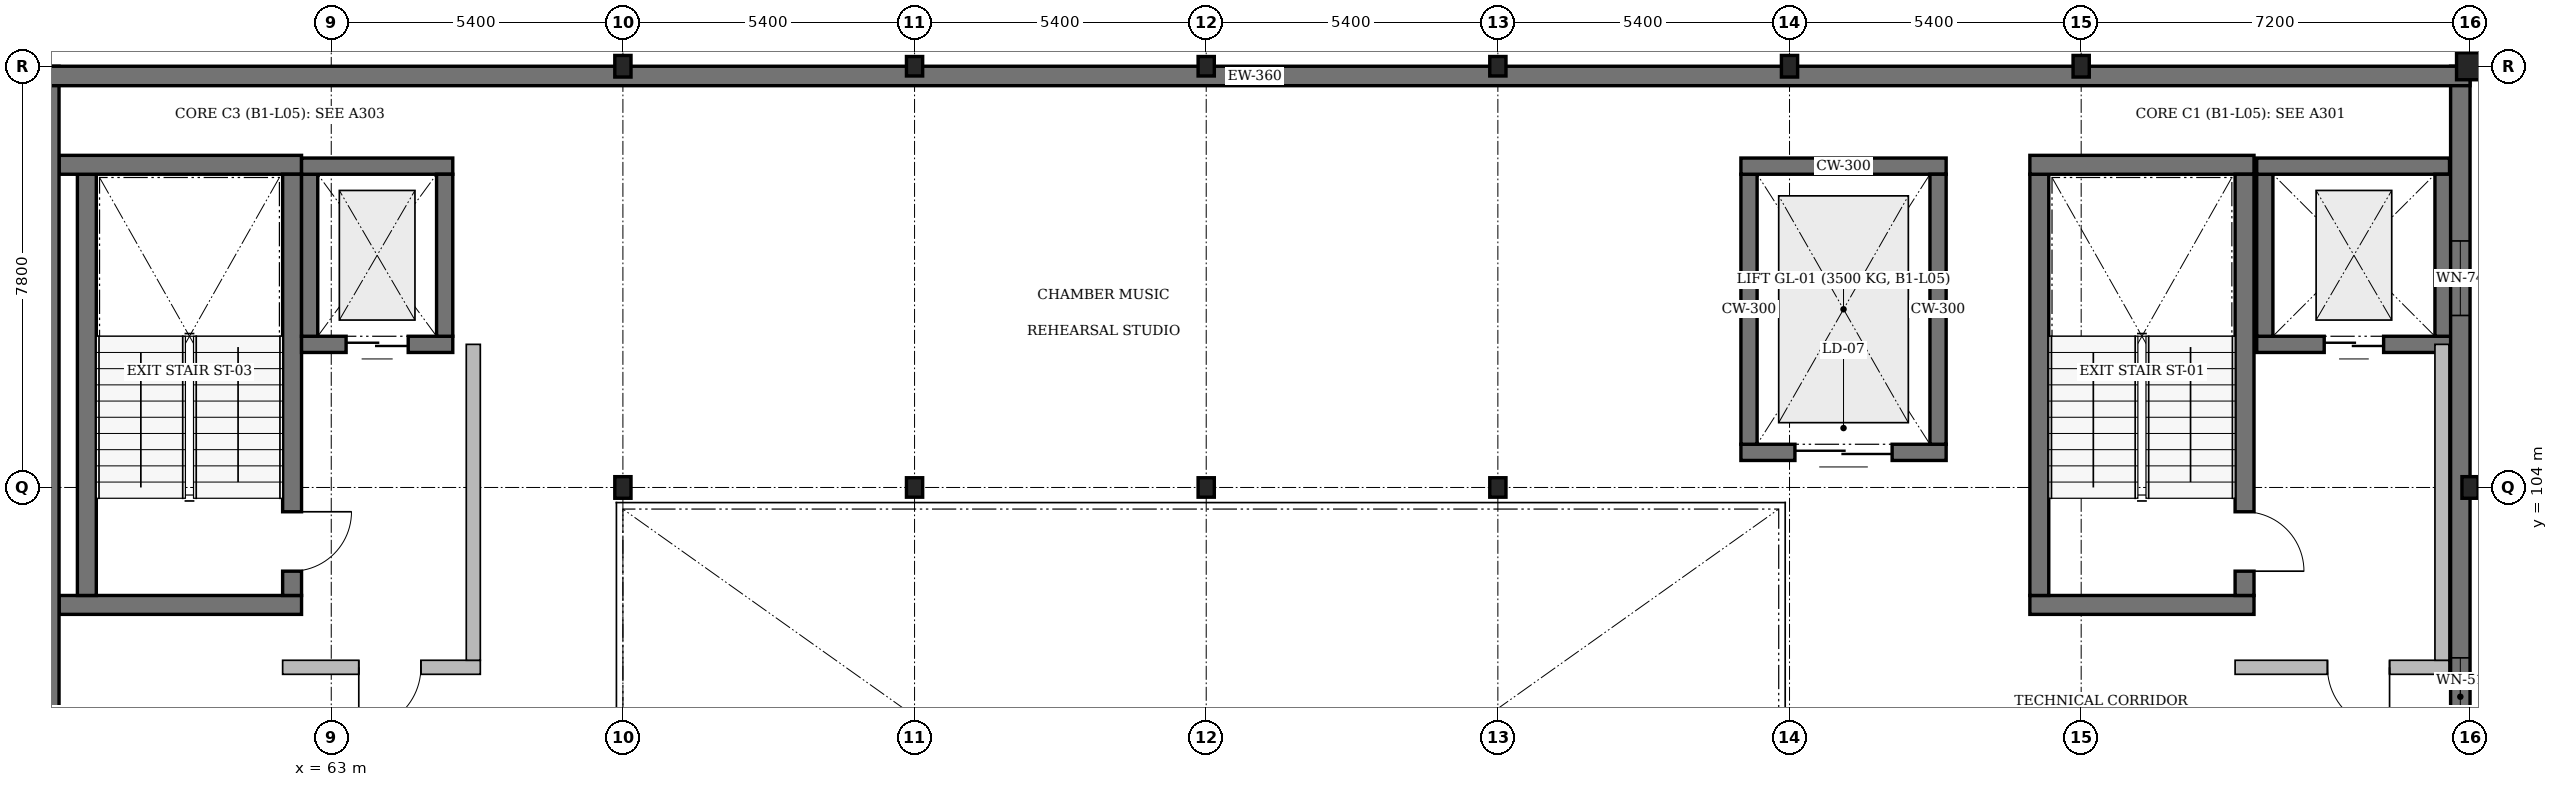
"""IFC4 building model, lengths in metres.
Left out: names, types, materials, properties, quantities, classifications, styles, units other than length and angle.
Written with IfcOpenShell. Run it as: python <this file> out.ifc"""

import sys

from ifc_helpers import new_model, si_unit, direction, frame, frame_2d, origin, origin_2d, place, context, subcontext, project, spatial, rectangle, i_section, extrude, element, fill, save


model = new_model("IFC4")
c1 = context("Model", 3, precision=1e-05, world=origin(), true_north=direction((0.0, 1.0)))
c2 = subcontext(c1, "Body", "Model", "MODEL_VIEW")
j1 = project(units=[si_unit("LENGTHUNIT", "METRE"), si_unit("PLANEANGLEUNIT", "RADIAN")], contexts=[c1])
p1 = place(None, origin())
s1 = spatial("IfcSite", under=j1, at=p1, CompositionType="ELEMENT")
p2 = place(p1, origin())
s2 = spatial("IfcBuilding", under=s1, at=p2, CompositionType="ELEMENT")
p3 = place(p2, frame((0.0, 0.0, 17.1)))
s3 = spatial("IfcBuildingStorey", under=s2, at=p3, CompositionType="ELEMENT", Elevation=17.1)
for number, where, z_axis, x_axis in (
    (1, (68.4, 104.0, 0.0), (0.0, 0.0, 1.0), (1.0, 0.0, 0.0)),
    (2, (68.4, 111.8, 0.0), (0.0, 0.0, 1.0), (1.0, 0.0, 0.0)),
):
    element("IfcColumn", number, at=place(p3, frame(where, z_axis=z_axis, x_axis=x_axis)), inside=s3, PredefinedType="COLUMN", context=c2, shape_type="SweptSolid", body=[
        extrude(i_section(OverallWidth=0.3, OverallDepth=0.4, WebThickness=0.013, FlangeThickness=0.024, FilletRadius=0.027, at=origin_2d()), origin(), (0.0, 0.0, 1.0), 3.9),
    ])
for number, where, z_axis, x_axis in (
    (3, (73.8, 104.0, 0.0), (0.0, 0.0, 1.0), (1.0, 0.0, 0.0)),
    (4, (73.8, 111.8, 0.0), (0.0, 0.0, 1.0), (1.0, 0.0, 0.0)),
    (5, (79.2, 104.0, 0.0), (0.0, 0.0, 1.0), (1.0, 0.0, 0.0)),
    (6, (79.2, 111.8, 0.0), (0.0, 0.0, 1.0), (1.0, 0.0, 0.0)),
    (7, (84.6, 104.0, 0.0), (0.0, 0.0, 1.0), (1.0, 0.0, 0.0)),
    (8, (84.6, 111.8, 0.0), (0.0, 0.0, 1.0), (1.0, 0.0, 0.0)),
):
    element("IfcColumn", number, at=place(p3, frame(where, z_axis=z_axis, x_axis=x_axis)), inside=s3, PredefinedType="COLUMN", context=c2, shape_type="SweptSolid", body=[
        extrude(i_section(OverallWidth=0.3, OverallDepth=0.36, WebThickness=0.012, FlangeThickness=0.022, FilletRadius=0.027, at=origin_2d()), origin(), (0.0, 0.0, 1.0), 3.9),
    ])
for number, where, z_axis, x_axis in (
    (9, (90.0, 111.8, 0.0), (0.0, 0.0, 1.0), (1.0, 0.0, 0.0)),
    (10, (95.4, 111.8, 0.0), (0.0, 0.0, 1.0), (1.0, 0.0, 0.0)),
    (11, (102.6, 104.0, 0.0), (0.0, 0.0, 1.0), (1.0, 0.0, 0.0)),
):
    element("IfcColumn", number, at=place(p3, frame(where, z_axis=z_axis, x_axis=x_axis)), inside=s3, PredefinedType="COLUMN", context=c2, shape_type="SweptSolid", body=[
        extrude(i_section(OverallWidth=0.3, OverallDepth=0.4, WebThickness=0.013, FlangeThickness=0.024, FilletRadius=0.027, at=origin_2d()), origin(), (0.0, 0.0, 1.0), 3.9),
    ])
p4 = place(p3, frame((102.6, 111.8, 0.0), z_axis=(0.0, 0.0, 1.0), x_axis=(1.0, 0.0, 0.0)))
e12 = element("IfcColumn", 12, at=p4, inside=s3, PredefinedType="COLUMN", context=c2, shape_type="SweptSolid", body=[
    extrude(rectangle(XDim=0.5, YDim=0.5, at=origin_2d()), origin(), (0.0, 0.0, 1.0), 3.9),
])
p5 = place(p3, frame((98.6, 101.825, 0.0), z_axis=(0.0, 0.0, 1.0), x_axis=(-1.0, 0.0, 0.0)))
e13 = element("IfcWall", 13, at=p5, inside=s3, PredefinedType="SOLIDWALL", context=c2, shape_type="SweptSolid", body=[
    extrude(rectangle(XDim=4.15, YDim=0.35, at=frame_2d((2.075, 0.0))), origin(), (0.0, 0.0, 1.0), 3.9),
])
p6 = place(p3, frame((94.625, 102.0, 0.0), z_axis=(0.0, 0.0, 1.0), x_axis=(0.0, 1.0, 0.0)))
e14 = element("IfcWall", 14, at=p6, inside=s3, PredefinedType="SOLIDWALL", context=c2, shape_type="SweptSolid", body=[
    extrude(rectangle(XDim=7.8, YDim=0.35, at=frame_2d((3.9, 0.0))), origin(), (0.0, 0.0, 1.0), 3.9),
])
p7 = place(p3, frame((94.45, 109.975, 0.0), z_axis=(0.0, 0.0, 1.0), x_axis=(1.0, 0.0, 0.0)))
e15 = element("IfcWall", 15, at=p7, inside=s3, PredefinedType="SOLIDWALL", context=c2, shape_type="SweptSolid", body=[
    extrude(rectangle(XDim=4.15, YDim=0.35, at=frame_2d((2.075, 0.0))), origin(), (0.0, 0.0, 1.0), 3.9),
])
p8 = place(p3, frame((98.425, 109.8, 0.0), z_axis=(0.0, 0.0, 1.0), x_axis=(0.0, -1.0, 0.0)))
e16 = element("IfcWall", 16, at=p8, inside=s3, PredefinedType="SOLIDWALL", context=c2, shape_type="SweptSolid", body=[
    extrude(rectangle(XDim=7.8, YDim=0.35, at=frame_2d((3.9, 0.0))), origin(), (0.0, 0.0, 1.0), 3.9),
])
p9 = place(p8, frame((6.25, 0.0, 0.0)))
e17 = element("IfcOpeningElement", 17, at=p9, cuts=e16, PredefinedType="OPENING", context=c2, shape_type="SweptSolid", body=[
    extrude(rectangle(XDim=1.1, YDim=2.15, at=frame_2d((0.55, 1.075))), frame((0.0, 0.195, 0.0), z_axis=(0.0, -1.0, 0.0), x_axis=(1.0, 0.0, 0.0)), (0.0, 0.0, 1.0), 0.39),
])
p10 = place(p3, frame((102.25, 106.65, 0.0), z_axis=(0.0, 0.0, 1.0), x_axis=(-1.0, 0.0, 0.0)))
e18 = element("IfcWall", 18, at=p10, inside=s3, PredefinedType="SOLIDWALL", context=c2, shape_type="SweptSolid", body=[
    extrude(rectangle(XDim=3.6, YDim=0.3, at=frame_2d((1.8, 0.0))), origin(), (0.0, 0.0, 1.0), 3.9),
])
p11 = place(p10, frame((1.25, 0.0, 0.0)))
e19 = element("IfcOpeningElement", 19, at=p11, cuts=e18, PredefinedType="OPENING", context=c2, shape_type="SweptSolid", body=[
    extrude(rectangle(XDim=1.1, YDim=2.1, at=frame_2d((0.55, 1.05))), frame((0.0, 0.17, 0.0), z_axis=(0.0, -1.0, 0.0), x_axis=(1.0, 0.0, 0.0)), (0.0, 0.0, 1.0), 0.34),
])
p12 = place(p3, frame((98.8, 106.8, 0.0), z_axis=(0.0, 0.0, 1.0), x_axis=(0.0, 1.0, 0.0)))
e20 = element("IfcWall", 20, at=p12, inside=s3, PredefinedType="SOLIDWALL", context=c2, shape_type="SweptSolid", body=[
    extrude(rectangle(XDim=3.0, YDim=0.3, at=frame_2d((1.5, 0.0))), origin(), (0.0, 0.0, 1.0), 3.9),
])
p13 = place(p3, frame((98.65, 109.95, 0.0), z_axis=(0.0, 0.0, 1.0), x_axis=(1.0, 0.0, 0.0)))
e21 = element("IfcWall", 21, at=p13, inside=s3, PredefinedType="SOLIDWALL", context=c2, shape_type="SweptSolid", body=[
    extrude(rectangle(XDim=3.57, YDim=0.3, at=frame_2d((1.785, 0.0))), origin(), (0.0, 0.0, 1.0), 3.9),
])
p14 = place(p3, frame((102.1, 109.8, 0.0), z_axis=(0.0, 0.0, 1.0), x_axis=(0.0, -1.0, 0.0)))
e22 = element("IfcWall", 22, at=p14, inside=s3, PredefinedType="SOLIDWALL", context=c2, shape_type="SweptSolid", body=[
    extrude(rectangle(XDim=3.0, YDim=0.3, at=frame_2d((1.5, 0.0))), origin(), (0.0, 0.0, 1.0), 3.9),
])
p15 = place(p3, frame((102.21, 100.67, 0.0), z_axis=(0.0, 0.0, 1.0), x_axis=(-1.0, 0.0, 0.0)))
e23 = element("IfcWall", 23, at=p15, inside=s3, PredefinedType="SOLIDWALL", context=c2, shape_type="SweptSolid", body=[
    extrude(rectangle(XDim=3.96, YDim=0.26, at=frame_2d((1.98, 0.0))), origin(), (0.0, 0.0, 1.0), 3.68),
])
p16 = place(p15, frame((1.1, 0.0, 0.0)))
e24 = element("IfcOpeningElement", 24, at=p16, cuts=e23, PredefinedType="OPENING", context=c2, shape_type="SweptSolid", body=[
    extrude(rectangle(XDim=1.15, YDim=2.2, at=frame_2d((0.575, 1.1))), frame((0.0, 0.15, 0.0), z_axis=(0.0, -1.0, 0.0), x_axis=(1.0, 0.0, 0.0)), (0.0, 0.0, 1.0), 0.3),
])
p17 = place(p3, frame((102.08, 106.65, 0.0), z_axis=(0.0, 0.0, 1.0), x_axis=(0.0, -1.0, 0.0)))
e25 = element("IfcWall", 25, at=p17, inside=s3, PredefinedType="SOLIDWALL", context=c2, shape_type="SweptSolid", body=[
    extrude(rectangle(XDim=5.85, YDim=0.26, at=frame_2d((2.925, 0.0))), origin(), (0.0, 0.0, 1.0), 3.68),
])
p18 = place(p3, frame((62.45, 101.825, 0.0), z_axis=(0.0, 0.0, 1.0), x_axis=(-1.0, 0.0, 0.0)))
e26 = element("IfcWall", 26, at=p18, inside=s3, PredefinedType="SOLIDWALL", context=c2, shape_type="SweptSolid", body=[
    extrude(rectangle(XDim=4.49, YDim=0.35, at=frame_2d((2.245, 0.0))), origin(), (0.0, 0.0, 1.0), 3.9),
])
p19 = place(p3, frame((58.475, 102.0, 0.0), z_axis=(0.0, 0.0, 1.0), x_axis=(0.0, 1.0, 0.0)))
e27 = element("IfcWall", 27, at=p19, inside=s3, PredefinedType="SOLIDWALL", context=c2, shape_type="SweptSolid", body=[
    extrude(rectangle(XDim=7.8, YDim=0.35, at=frame_2d((3.9, 0.0))), origin(), (0.0, 0.0, 1.0), 3.9),
])
p20 = place(p3, frame((57.96, 109.975, 0.0), z_axis=(0.0, 0.0, 1.0), x_axis=(1.0, 0.0, 0.0)))
e28 = element("IfcWall", 28, at=p20, inside=s3, PredefinedType="SOLIDWALL", context=c2, shape_type="SweptSolid", body=[
    extrude(rectangle(XDim=4.49, YDim=0.35, at=frame_2d((2.245, 0.0))), origin(), (0.0, 0.0, 1.0), 3.9),
])
p21 = place(p3, frame((62.275, 109.8, 0.0), z_axis=(0.0, 0.0, 1.0), x_axis=(0.0, -1.0, 0.0)))
e29 = element("IfcWall", 29, at=p21, inside=s3, PredefinedType="SOLIDWALL", context=c2, shape_type="SweptSolid", body=[
    extrude(rectangle(XDim=7.8, YDim=0.35, at=frame_2d((3.9, 0.0))), origin(), (0.0, 0.0, 1.0), 3.9),
])
p22 = place(p21, frame((6.25, 0.0, 0.0)))
e30 = element("IfcOpeningElement", 30, at=p22, cuts=e29, PredefinedType="OPENING", context=c2, shape_type="SweptSolid", body=[
    extrude(rectangle(XDim=1.1, YDim=2.15, at=frame_2d((0.55, 1.075))), frame((0.0, 0.195, 0.0), z_axis=(0.0, -1.0, 0.0), x_axis=(1.0, 0.0, 0.0)), (0.0, 0.0, 1.0), 0.39),
])
p23 = place(p3, frame((65.25, 106.65, 0.0), z_axis=(0.0, 0.0, 1.0), x_axis=(-1.0, 0.0, 0.0)))
e31 = element("IfcWall", 31, at=p23, inside=s3, PredefinedType="SOLIDWALL", context=c2, shape_type="SweptSolid", body=[
    extrude(rectangle(XDim=2.8, YDim=0.3, at=frame_2d((1.4, 0.0))), origin(), (0.0, 0.0, 1.0), 3.9),
])
p24 = place(p23, frame((0.825, 0.0, 0.0)))
e32 = element("IfcOpeningElement", 32, at=p24, cuts=e31, PredefinedType="OPENING", context=c2, shape_type="SweptSolid", body=[
    extrude(rectangle(XDim=1.15, YDim=2.1, at=frame_2d((0.575, 1.05))), frame((0.0, 0.17, 0.0), z_axis=(0.0, -1.0, 0.0), x_axis=(1.0, 0.0, 0.0)), (0.0, 0.0, 1.0), 0.34),
])
p25 = place(p3, frame((62.6, 106.8, 0.0), z_axis=(0.0, 0.0, 1.0), x_axis=(0.0, 1.0, 0.0)))
e33 = element("IfcWall", 33, at=p25, inside=s3, PredefinedType="SOLIDWALL", context=c2, shape_type="SweptSolid", body=[
    extrude(rectangle(XDim=3.0, YDim=0.3, at=frame_2d((1.5, 0.0))), origin(), (0.0, 0.0, 1.0), 3.9),
])
p26 = place(p3, frame((62.45, 109.95, 0.0), z_axis=(0.0, 0.0, 1.0), x_axis=(1.0, 0.0, 0.0)))
e34 = element("IfcWall", 34, at=p26, inside=s3, PredefinedType="SOLIDWALL", context=c2, shape_type="SweptSolid", body=[
    extrude(rectangle(XDim=2.8, YDim=0.3, at=frame_2d((1.4, 0.0))), origin(), (0.0, 0.0, 1.0), 3.9),
])
p27 = place(p3, frame((65.1, 109.8, 0.0), z_axis=(0.0, 0.0, 1.0), x_axis=(0.0, -1.0, 0.0)))
e35 = element("IfcWall", 35, at=p27, inside=s3, PredefinedType="SOLIDWALL", context=c2, shape_type="SweptSolid", body=[
    extrude(rectangle(XDim=3.0, YDim=0.3, at=frame_2d((1.5, 0.0))), origin(), (0.0, 0.0, 1.0), 3.9),
])
p28 = place(p3, frame((65.76, 100.67, 0.0), z_axis=(0.0, 0.0, 1.0), x_axis=(-1.0, 0.0, 0.0)))
e36 = element("IfcWall", 36, at=p28, inside=s3, PredefinedType="SOLIDWALL", context=c2, shape_type="SweptSolid", body=[
    extrude(rectangle(XDim=3.66, YDim=0.26, at=frame_2d((1.83, 0.0))), origin(), (0.0, 0.0, 1.0), 3.68),
])
p29 = place(p28, frame((1.1, 0.0, 0.0)))
e37 = element("IfcOpeningElement", 37, at=p29, cuts=e36, PredefinedType="OPENING", context=c2, shape_type="SweptSolid", body=[
    extrude(rectangle(XDim=1.15, YDim=2.2, at=frame_2d((0.575, 1.1))), frame((0.0, 0.15, 0.0), z_axis=(0.0, -1.0, 0.0), x_axis=(1.0, 0.0, 0.0)), (0.0, 0.0, 1.0), 0.3),
])
p30 = place(p3, frame((65.63, 106.65, 0.0), z_axis=(0.0, 0.0, 1.0), x_axis=(0.0, -1.0, 0.0)))
e38 = element("IfcWall", 38, at=p30, inside=s3, PredefinedType="SOLIDWALL", context=c2, shape_type="SweptSolid", body=[
    extrude(rectangle(XDim=5.85, YDim=0.26, at=frame_2d((2.925, 0.0))), origin(), (0.0, 0.0, 1.0), 3.68),
])
p31 = place(p3, frame((92.9, 104.65, 0.0), z_axis=(0.0, 0.0, 1.0), x_axis=(-1.0, 0.0, 0.0)))
e39 = element("IfcWall", 39, at=p31, inside=s3, PredefinedType="SOLIDWALL", context=c2, shape_type="SweptSolid", body=[
    extrude(rectangle(XDim=3.8, YDim=0.3, at=frame_2d((1.9, 0.0))), origin(), (0.0, 0.0, 1.0), 3.9),
])
p32 = place(p31, frame((1.0, 0.0, 0.0)))
e40 = element("IfcOpeningElement", 40, at=p32, cuts=e39, PredefinedType="OPENING", context=c2, shape_type="SweptSolid", body=[
    extrude(rectangle(XDim=1.8, YDim=2.4, at=frame_2d((0.9, 1.2))), frame((0.0, 0.17, 0.0), z_axis=(0.0, -1.0, 0.0), x_axis=(1.0, 0.0, 0.0)), (0.0, 0.0, 1.0), 0.34),
])
p33 = place(p3, frame((89.25, 104.8, 0.0), z_axis=(0.0, 0.0, 1.0), x_axis=(0.0, 1.0, 0.0)))
e41 = element("IfcWall", 41, at=p33, inside=s3, PredefinedType="SOLIDWALL", context=c2, shape_type="SweptSolid", body=[
    extrude(rectangle(XDim=5.0, YDim=0.3, at=frame_2d((2.5, 0.0))), origin(), (0.0, 0.0, 1.0), 3.9),
])
p34 = place(p3, frame((89.1, 109.95, 0.0), z_axis=(0.0, 0.0, 1.0), x_axis=(1.0, 0.0, 0.0)))
e42 = element("IfcWall", 42, at=p34, inside=s3, PredefinedType="SOLIDWALL", context=c2, shape_type="SweptSolid", body=[
    extrude(rectangle(XDim=3.8, YDim=0.3, at=frame_2d((1.9, 0.0))), origin(), (0.0, 0.0, 1.0), 3.9),
])
p35 = place(p3, frame((92.75, 109.8, 0.0), z_axis=(0.0, 0.0, 1.0), x_axis=(0.0, -1.0, 0.0)))
e43 = element("IfcWall", 43, at=p35, inside=s3, PredefinedType="SOLIDWALL", context=c2, shape_type="SweptSolid", body=[
    extrude(rectangle(XDim=5.0, YDim=0.3, at=frame_2d((2.5, 0.0))), origin(), (0.0, 0.0, 1.0), 3.9),
])
p36 = place(p3, frame((57.78, 87.8, 0.0), z_axis=(0.0, 0.0, 1.0), x_axis=(0.0, 1.0, 0.0)))
e44 = element("IfcWall", 44, at=p36, inside=s3, PredefinedType="SOLIDWALL", context=c2, shape_type="SweptSolid", body=[
    extrude(rectangle(XDim=24.0, YDim=0.36, at=frame_2d((12.0, 0.0))), origin(), (0.0, 0.0, 1.0), 3.65),
])
p37 = place(p3, frame((102.42, 87.8, 0.0), z_axis=(0.0, 0.0, 1.0), x_axis=(0.0, 1.0, 0.0)))
e45 = element("IfcWall", 45, at=p37, inside=s3, PredefinedType="SOLIDWALL", context=c2, shape_type="SweptSolid", body=[
    extrude(rectangle(XDim=24.0, YDim=0.36, at=frame_2d((12.0, 0.0))), origin(), (0.0, 0.0, 1.0), 3.65),
])
p38 = place(p37, frame((3.625, 0.0, 0.95)))
e46 = element("IfcOpeningElement", 46, at=p38, cuts=e45, PredefinedType="OPENING", context=c2, shape_type="SweptSolid", body=[
    extrude(rectangle(XDim=1.15, YDim=1.95, at=frame_2d((0.575, 0.975))), frame((0.0, 0.2, 0.0), z_axis=(0.0, -1.0, 0.0), x_axis=(1.0, 0.0, 0.0)), (0.0, 0.0, 1.0), 0.4),
])
p39 = place(p37, frame((11.605, 0.0, 0.95)))
e47 = element("IfcOpeningElement", 47, at=p39, cuts=e45, PredefinedType="OPENING", context=c2, shape_type="SweptSolid", body=[
    extrude(rectangle(XDim=1.44, YDim=1.7, at=frame_2d((0.72, 0.85))), frame((0.0, 0.2, 0.0), z_axis=(0.0, -1.0, 0.0), x_axis=(1.0, 0.0, 0.0)), (0.0, 0.0, 1.0), 0.4),
])
p40 = place(p37, frame((19.385, 0.0, 0.95)))
e48 = element("IfcOpeningElement", 48, at=p40, cuts=e45, PredefinedType="OPENING", context=c2, shape_type="SweptSolid", body=[
    extrude(rectangle(XDim=1.38, YDim=1.95, at=frame_2d((0.69, 0.975))), frame((0.0, 0.2, 0.0), z_axis=(0.0, -1.0, 0.0), x_axis=(1.0, 0.0, 0.0)), (0.0, 0.0, 1.0), 0.4),
])
p41 = place(p3, frame((57.6, 111.62, 0.0), z_axis=(0.0, 0.0, 1.0), x_axis=(1.0, 0.0, 0.0)))
e49 = element("IfcWall", 49, at=p41, inside=s3, PredefinedType="SOLIDWALL", context=c2, shape_type="SweptSolid", body=[
    extrude(rectangle(XDim=45.0, YDim=0.36, at=frame_2d((22.5, 0.0))), origin(), (0.0, 0.0, 1.0), 3.65),
])
p42 = place(p9, origin())
e50 = element("IfcDoor", 50, at=p42, inside=s3, OperationType="SINGLE_SWING_RIGHT", PredefinedType="DOOR", context=c2, shape_type="SweptSolid", body=[
    extrude(rectangle(XDim=1.1, YDim=2.15, at=frame_2d((0.55, 1.075))), frame((0.0, 0.025, 0.0), z_axis=(0.0, -1.0, 0.0), x_axis=(1.0, 0.0, 0.0)), (0.0, 0.0, 1.0), 0.05),
])
fill(e17, e50)
p43 = place(p11, origin())
e51 = element("IfcDoor", 51, at=p43, inside=s3, OperationType="DOUBLE_DOOR_SLIDING", PredefinedType="DOOR", context=c2, shape_type="SweptSolid", body=[
    extrude(rectangle(XDim=1.1, YDim=2.1, at=frame_2d((0.55, 1.05))), frame((0.0, 0.025, 0.0), z_axis=(0.0, -1.0, 0.0), x_axis=(1.0, 0.0, 0.0)), (0.0, 0.0, 1.0), 0.05),
])
fill(e19, e51)
p44 = place(p16, origin())
e52 = element("IfcDoor", 52, at=p44, inside=s3, OperationType="SINGLE_SWING_LEFT", PredefinedType="DOOR", context=c2, shape_type="SweptSolid", body=[
    extrude(rectangle(XDim=1.15, YDim=2.2, at=frame_2d((0.575, 1.1))), frame((0.0, 0.025, 0.0), z_axis=(0.0, -1.0, 0.0), x_axis=(1.0, 0.0, 0.0)), (0.0, 0.0, 1.0), 0.05),
])
fill(e24, e52)
p45 = place(p22, origin())
e53 = element("IfcDoor", 53, at=p45, inside=s3, OperationType="SINGLE_SWING_LEFT", PredefinedType="DOOR", context=c2, shape_type="SweptSolid", body=[
    extrude(rectangle(XDim=1.1, YDim=2.15, at=frame_2d((0.55, 1.075))), frame((0.0, 0.025, 0.0), z_axis=(0.0, -1.0, 0.0), x_axis=(1.0, 0.0, 0.0)), (0.0, 0.0, 1.0), 0.05),
])
fill(e30, e53)
p46 = place(p24, origin())
e54 = element("IfcDoor", 54, at=p46, inside=s3, OperationType="DOUBLE_DOOR_SLIDING", PredefinedType="DOOR", context=c2, shape_type="SweptSolid", body=[
    extrude(rectangle(XDim=1.15, YDim=2.1, at=frame_2d((0.575, 1.05))), frame((0.0, 0.025, 0.0), z_axis=(0.0, -1.0, 0.0), x_axis=(1.0, 0.0, 0.0)), (0.0, 0.0, 1.0), 0.05),
])
fill(e32, e54)
p47 = place(p29, origin())
e55 = element("IfcDoor", 55, at=p47, inside=s3, OperationType="SINGLE_SWING_RIGHT", PredefinedType="DOOR", context=c2, shape_type="SweptSolid", body=[
    extrude(rectangle(XDim=1.15, YDim=2.2, at=frame_2d((0.575, 1.1))), frame((0.0, 0.025, 0.0), z_axis=(0.0, -1.0, 0.0), x_axis=(1.0, 0.0, 0.0)), (0.0, 0.0, 1.0), 0.05),
])
fill(e37, e55)
p48 = place(p32, origin())
e56 = element("IfcDoor", 56, at=p48, inside=s3, OperationType="DOUBLE_DOOR_SLIDING", PredefinedType="DOOR", context=c2, shape_type="SweptSolid", body=[
    extrude(rectangle(XDim=1.8, YDim=2.4, at=frame_2d((0.9, 1.2))), frame((0.0, 0.025, 0.0), z_axis=(0.0, -1.0, 0.0), x_axis=(1.0, 0.0, 0.0)), (0.0, 0.0, 1.0), 0.05),
])
fill(e40, e56)
p49 = place(p39, origin())
e57 = element("IfcWindow", 57, at=p49, inside=s3, PartitioningType="SINGLE_PANEL", PredefinedType="WINDOW", context=c2, shape_type="SweptSolid", body=[
    extrude(rectangle(XDim=1.44, YDim=1.7, at=frame_2d((0.72, 0.85))), frame((0.0, 0.03, 0.0), z_axis=(0.0, -1.0, 0.0), x_axis=(1.0, 0.0, 0.0)), (0.0, 0.0, 1.0), 0.06),
])
fill(e47, e57)
p50 = place(p40, origin())
e58 = element("IfcWindow", 58, at=p50, inside=s3, PartitioningType="SINGLE_PANEL", PredefinedType="WINDOW", context=c2, shape_type="SweptSolid", body=[
    extrude(rectangle(XDim=1.38, YDim=1.95, at=frame_2d((0.69, 0.975))), frame((0.0, 0.03, 0.0), z_axis=(0.0, -1.0, 0.0), x_axis=(1.0, 0.0, 0.0)), (0.0, 0.0, 1.0), 0.06),
])
fill(e48, e58)
save(model, sys.argv[1])
